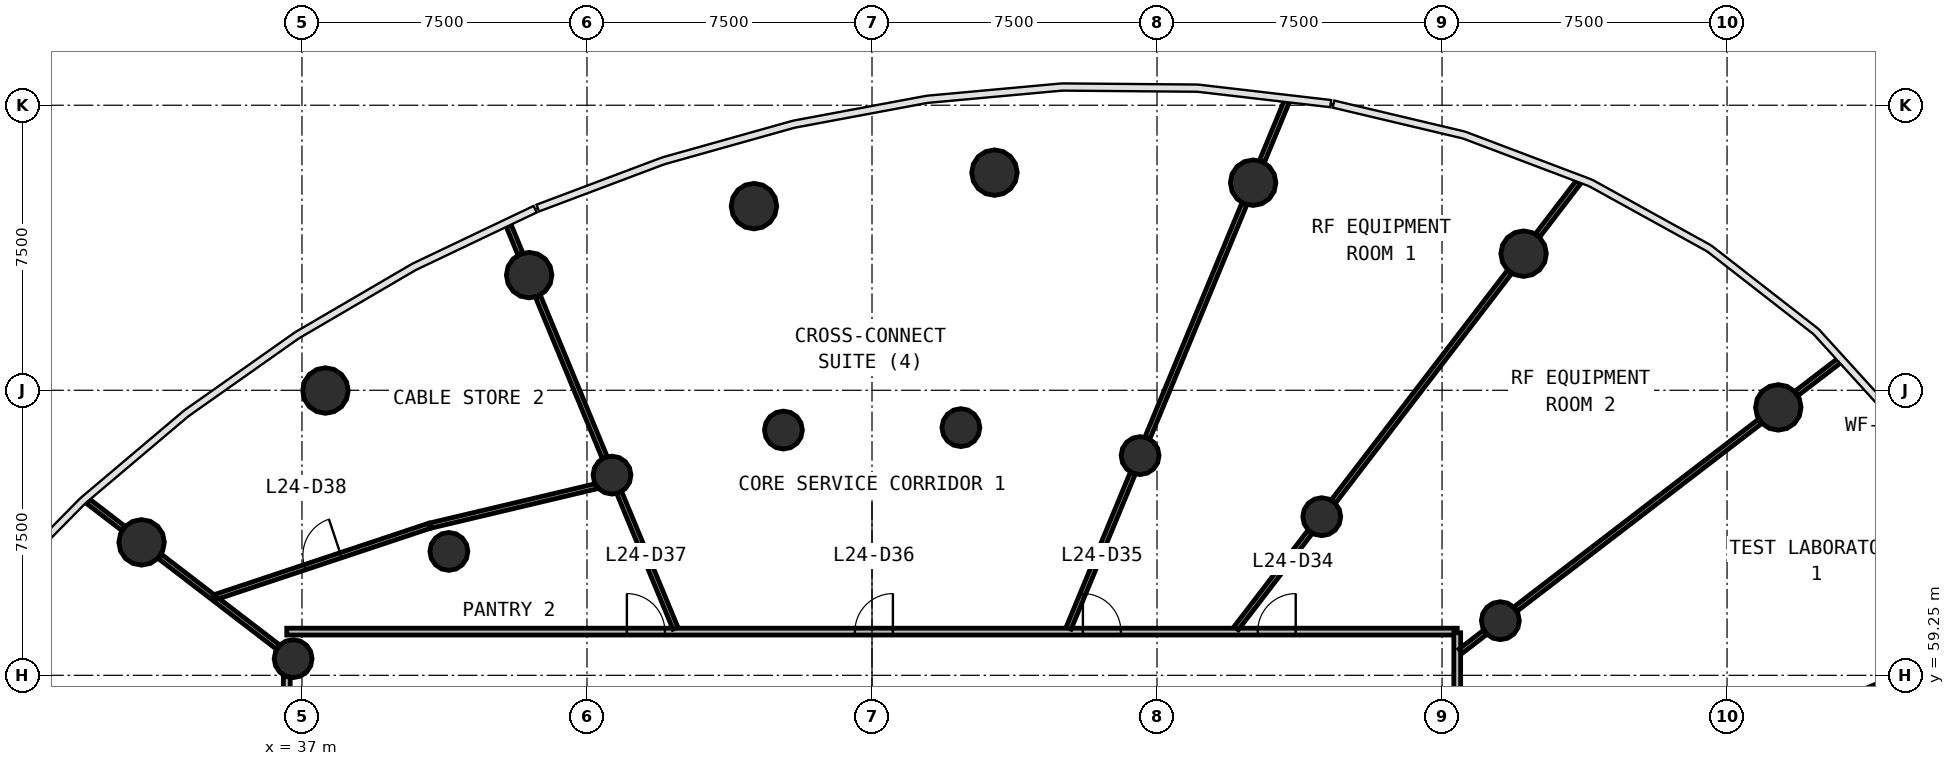
"""IFC4 building model, lengths in metres.
Left out: names, types, materials, properties, quantities, classifications, styles, units other than length and angle.
Written with IfcOpenShell. Run it as: python <this file> out.ifc"""

import sys

from ifc_helpers import new_model, si_unit, direction, frame, frame_2d, origin, origin_2d, place, context, subcontext, project, spatial, rectangle, circle, extrude, source, transform, mapped, element, fill, save


model = new_model("IFC4")
c1 = context("Model", 3, precision=1e-05, world=origin(), true_north=direction((0.0, 1.0)))
c2 = subcontext(c1, "Body", "Model", "MODEL_VIEW")
j1 = project(units=[si_unit("LENGTHUNIT", "METRE"), si_unit("PLANEANGLEUNIT", "RADIAN")], contexts=[c1])
p1 = place(None, origin())
s1 = spatial("IfcSite", under=j1, at=p1, CompositionType="ELEMENT")
p2 = place(p1, origin())
s2 = spatial("IfcBuilding", under=s1, at=p2, CompositionType="ELEMENT")
p3 = place(p2, frame((0.0, 0.0, 104.4)))
s3 = spatial("IfcBuildingStorey", under=s2, at=p3, CompositionType="ELEMENT", Elevation=104.4)
m1 = source(origin(), c2, "Body", "SweptSolid", [
    extrude(circle(Radius=0.6, at=origin_2d()), origin(), (0.0, 0.0, 1.0), 4.1),
])
for number, where, z_axis, x_axis in (
    (1, (75.848, 66.299, 0.0), (0.0, 0.0, 1.0), (1.0, 0.0, 0.0)),
    (2, (69.146, 70.345, 0.0), (0.0, 0.0, 1.0), (1.0, 0.0, 0.0)),
    (3, (62.029, 72.212, 0.0), (0.0, 0.0, 1.0), (1.0, 0.0, 0.0)),
    (4, (55.222, 72.477, 0.0), (0.0, 0.0, 1.0), (1.0, 0.0, 0.0)),
    (5, (48.894, 71.595, 0.0), (0.0, 0.0, 1.0), (1.0, 0.0, 0.0)),
    (6, (42.978, 69.781, 0.0), (0.0, 0.0, 1.0), (1.0, 0.0, 0.0)),
    (7, (37.618, 66.743, 0.0), (0.0, 0.0, 1.0), (1.0, 0.0, 0.0)),
    (8, (32.78, 62.748, 0.0), (0.0, 0.0, 1.0), (1.0, 0.0, 0.0)),
):
    element("IfcColumn", number, at=place(p3, frame(where, z_axis=z_axis, x_axis=x_axis)), inside=s3, PredefinedType="COLUMN", context=c2, shape_type="MappedRepresentation", body=[
        mapped(m1, transform((0.0, 0.0, 0.0), scale=1.0)),
    ])
m2 = source(origin(), c2, "Body", "SweptSolid", [
    extrude(circle(Radius=0.5, at=origin_2d()), origin(), (0.0, 0.0, 1.0), 4.1),
])
for number, where, z_axis, x_axis in (
    (9, (68.535, 60.688, 0.0), (0.0, 0.0, 1.0), (1.0, 0.0, 0.0)),
    (10, (63.835, 63.424, 0.0), (0.0, 0.0, 1.0), (1.0, 0.0, 0.0)),
    (11, (59.055, 65.031, 0.0), (0.0, 0.0, 1.0), (1.0, 0.0, 0.0)),
    (12, (54.339, 65.767, 0.0), (0.0, 0.0, 1.0), (1.0, 0.0, 0.0)),
    (13, (49.669, 65.703, 0.0), (0.0, 0.0, 1.0), (1.0, 0.0, 0.0)),
    (14, (45.158, 64.518, 0.0), (0.0, 0.0, 1.0), (1.0, 0.0, 0.0)),
    (15, (40.866, 62.51, 0.0), (0.0, 0.0, 1.0), (1.0, 0.0, 0.0)),
    (16, (36.768, 59.688, 0.0), (0.0, 0.0, 1.0), (1.0, 0.0, 0.0)),
):
    element("IfcColumn", number, at=place(p3, frame(where, z_axis=z_axis, x_axis=x_axis)), inside=s3, PredefinedType="COLUMN", context=c2, shape_type="MappedRepresentation", body=[
        mapped(m2, transform((0.0, 0.0, 0.0), scale=1.0)),
    ])
p4 = place(p3, frame((36.6, 60.4, 0.0), z_axis=(0.0, 0.0, 1.0), x_axis=(1.0, 0.0, 0.0)))
e17 = element("IfcWall", 17, at=p4, inside=s3, PredefinedType="PARTITIONING", context=c2, shape_type="SweptSolid", body=[
    extrude(rectangle(XDim=30.8, YDim=0.18, at=frame_2d((15.4, 0.0))), origin(), (0.0, 0.0, 1.0), 2.9),
])
p5 = place(p4, frame((25.55, 0.0, 0.0)))
e18 = element("IfcOpeningElement", 18, at=p5, cuts=e17, PredefinedType="OPENING", context=c2, shape_type="SweptSolid", body=[
    extrude(rectangle(XDim=1.0, YDim=2.1, at=frame_2d((0.5, 1.05))), frame((0.0, 0.1, 0.0), z_axis=(0.0, -1.0, 0.0), x_axis=(1.0, 0.0, 0.0)), (0.0, 0.0, 1.0), 0.2),
])
p6 = place(p4, frame((20.95, 0.0, 0.0)))
e19 = element("IfcOpeningElement", 19, at=p6, cuts=e17, PredefinedType="OPENING", context=c2, shape_type="SweptSolid", body=[
    extrude(rectangle(XDim=1.0, YDim=2.1, at=frame_2d((0.5, 1.05))), frame((0.0, 0.1, 0.0), z_axis=(0.0, -1.0, 0.0), x_axis=(1.0, 0.0, 0.0)), (0.0, 0.0, 1.0), 0.2),
])
p7 = place(p4, frame((14.95, 0.0, 0.0)))
e20 = element("IfcOpeningElement", 20, at=p7, cuts=e17, PredefinedType="OPENING", context=c2, shape_type="SweptSolid", body=[
    extrude(rectangle(XDim=1.0, YDim=2.1, at=frame_2d((0.5, 1.05))), frame((0.0, 0.1, 0.0), z_axis=(0.0, -1.0, 0.0), x_axis=(1.0, 0.0, 0.0)), (0.0, 0.0, 1.0), 0.2),
])
p8 = place(p4, frame((8.95, 0.0, 0.0)))
e21 = element("IfcOpeningElement", 21, at=p8, cuts=e17, PredefinedType="OPENING", context=c2, shape_type="SweptSolid", body=[
    extrude(rectangle(XDim=1.0, YDim=2.1, at=frame_2d((0.5, 1.05))), frame((0.0, 0.1, 0.0), z_axis=(0.0, -1.0, 0.0), x_axis=(1.0, 0.0, 0.0)), (0.0, 0.0, 1.0), 0.2),
])
p9 = place(p3, frame((67.4, 60.37, 0.0), z_axis=(0.0, 0.0, 1.0), x_axis=(0.0, -1.0, 0.0)))
e22 = element("IfcWall", 22, at=p9, inside=s3, PredefinedType="PARTITIONING", context=c2, shape_type="SweptSolid", body=[
    extrude(rectangle(XDim=23.583, YDim=0.18, at=frame_2d((11.791, 0.0))), origin(), (0.0, 0.0, 1.0), 2.9),
])
p10 = place(p9, frame((14.732, 0.0, 0.0)))
e23 = element("IfcOpeningElement", 23, at=p10, cuts=e22, PredefinedType="OPENING", context=c2, shape_type="SweptSolid", body=[
    extrude(rectangle(XDim=1.0, YDim=2.1, at=frame_2d((0.5, 1.05))), frame((0.0, 0.1, 0.0), z_axis=(0.0, -1.0, 0.0), x_axis=(1.0, 0.0, 0.0)), (0.0, 0.0, 1.0), 0.2),
])
p11 = place(p9, frame((11.333, 0.0, 0.0)))
e24 = element("IfcOpeningElement", 24, at=p11, cuts=e22, PredefinedType="OPENING", context=c2, shape_type="SweptSolid", body=[
    extrude(rectangle(XDim=1.0, YDim=2.1, at=frame_2d((0.5, 1.05))), frame((0.0, 0.1, 0.0), z_axis=(0.0, -1.0, 0.0), x_axis=(1.0, 0.0, 0.0)), (0.0, 0.0, 1.0), 0.2),
])
p12 = place(p9, frame((4.532, 0.0, 0.0)))
e25 = element("IfcOpeningElement", 25, at=p12, cuts=e22, PredefinedType="OPENING", context=c2, shape_type="SweptSolid", body=[
    extrude(rectangle(XDim=1.0, YDim=2.1, at=frame_2d((0.5, 1.05))), frame((0.0, 0.1, 0.0), z_axis=(0.0, -1.0, 0.0), x_axis=(1.0, 0.0, 0.0)), (0.0, 0.0, 1.0), 0.2),
])
p13 = place(p3, frame((36.6, 35.63, 0.0), z_axis=(0.0, 0.0, 1.0), x_axis=(0.0, 1.0, 0.0)))
e26 = element("IfcWall", 26, at=p13, inside=s3, PredefinedType="PARTITIONING", context=c2, shape_type="SweptSolid", body=[
    extrude(rectangle(XDim=23.583, YDim=0.18, at=frame_2d((11.791, 0.0))), origin(), (0.0, 0.0, 1.0), 2.9),
])
p14 = place(p13, frame((11.333, 0.0, 0.0)))
e27 = element("IfcOpeningElement", 27, at=p14, cuts=e26, PredefinedType="OPENING", context=c2, shape_type="SweptSolid", body=[
    extrude(rectangle(XDim=1.0, YDim=2.1, at=frame_2d((0.5, 1.05))), frame((0.0, 0.1, 0.0), z_axis=(0.0, -1.0, 0.0), x_axis=(1.0, 0.0, 0.0)), (0.0, 0.0, 1.0), 0.2),
])
p15 = place(p13, frame((9.133, 0.0, 0.0)))
e28 = element("IfcOpeningElement", 28, at=p15, cuts=e26, PredefinedType="OPENING", context=c2, shape_type="SweptSolid", body=[
    extrude(rectangle(XDim=1.0, YDim=2.1, at=frame_2d((0.5, 1.05))), frame((0.0, 0.1, 0.0), z_axis=(0.0, -1.0, 0.0), x_axis=(1.0, 0.0, 0.0)), (0.0, 0.0, 1.0), 0.2),
])
p16 = place(p3, frame((68.935, 60.995, 0.0), z_axis=(0.0, 0.0, 1.0), x_axis=(0.793358692504, 0.608754453805, 0.0)))
e29 = element("IfcWall", 29, at=p16, inside=s3, PredefinedType="PARTITIONING", context=c2, shape_type="SweptSolid", body=[
    extrude(rectangle(XDim=8.11, YDim=0.14, at=frame_2d((4.055, 0.0))), origin(), (0.0, 0.0, 1.0), 2.9),
])
p17 = place(p3, frame((64.142, 63.824, 0.0), z_axis=(0.0, 0.0, 1.0), x_axis=(0.608755907151, 0.793357577331, 0.0)))
e30 = element("IfcWall", 30, at=p17, inside=s3, PredefinedType="PARTITIONING", context=c2, shape_type="SweptSolid", body=[
    extrude(rectangle(XDim=7.615, YDim=0.14, at=frame_2d((3.808, 0.0))), origin(), (0.0, 0.0, 1.0), 2.9),
])
p18 = place(p3, frame((59.248, 65.498, 0.0), z_axis=(0.0, 0.0, 1.0), x_axis=(0.382696989205, 0.923873916968, 0.0)))
e31 = element("IfcWall", 31, at=p18, inside=s3, PredefinedType="PARTITIONING", context=c2, shape_type="SweptSolid", body=[
    extrude(rectangle(XDim=6.663, YDim=0.14, at=frame_2d((3.332, 0.0))), origin(), (0.0, 0.0, 1.0), 2.9),
])
p19 = place(p3, frame((34.675, 61.294, 0.0), z_axis=(0.0, 0.0, 1.0), x_axis=(0.948817917671, 0.315823620247, 0.0)))
e32 = element("IfcWall", 32, at=p19, inside=s3, PredefinedType="PARTITIONING", context=c2, shape_type="SweptSolid", body=[
    extrude(rectangle(XDim=5.981, YDim=0.14, at=frame_2d((2.99, 0.0))), origin(), (0.0, 0.0, 1.0), 2.9),
])
p20 = place(p19, frame((2.531, 0.0, 0.0)))
e33 = element("IfcOpeningElement", 33, at=p20, cuts=e32, PredefinedType="OPENING", context=c2, shape_type="SweptSolid", body=[
    extrude(rectangle(XDim=1.0, YDim=2.1, at=frame_2d((0.5, 1.05))), frame((0.0, 0.08, 0.0), z_axis=(0.0, -1.0, 0.0), x_axis=(1.0, 0.0, 0.0)), (0.0, 0.0, 1.0), 0.16),
])
p21 = place(p3, frame((74.998, 57.526, 0.0), z_axis=(0.0, 0.0, 1.0), x_axis=(0.923875965801, 0.382692043051, 0.0)))
e34 = element("IfcWall", 34, at=p21, inside=s3, PredefinedType="PARTITIONING", context=c2, shape_type="SweptSolid", body=[
    extrude(rectangle(XDim=5.302, YDim=0.14, at=frame_2d((2.651, 0.0))), origin(), (0.0, 0.0, 1.0), 2.9),
])
p22 = place(p3, frame((44.965, 64.984, 0.0), z_axis=(0.0, 0.0, 1.0), x_axis=(-0.382705930348, 0.923870213221, 0.0)))
e35 = element("IfcWall", 35, at=p22, inside=s3, PredefinedType="PARTITIONING", context=c2, shape_type="SweptSolid", body=[
    extrude(rectangle(XDim=4.587, YDim=0.14, at=frame_2d((2.293, 0.0))), origin(), (0.0, 0.0, 1.0), 2.9),
])
p23 = place(p3, frame((44.747, 64.226, 0.0), z_axis=(0.0, 0.0, 1.0), x_axis=(-0.973038547424, -0.230642548604, 0.0)))
e36 = element("IfcWall", 36, at=p23, inside=s3, PredefinedType="PARTITIONING", context=c2, shape_type="SweptSolid", body=[
    extrude(rectangle(XDim=4.489, YDim=0.14, at=frame_2d((2.245, 0.0))), origin(), (0.0, 0.0, 1.0), 2.9),
])
p24 = place(p3, frame((57.174, 60.49, 0.0), z_axis=(0.0, 0.0, 1.0), x_axis=(0.382672831764, 0.923883923353, 0.0)))
e37 = element("IfcWall", 37, at=p24, inside=s3, PredefinedType="PARTITIONING", context=c2, shape_type="SweptSolid", body=[
    extrude(rectangle(XDim=4.41, YDim=0.14, at=frame_2d((2.205, 0.0))), origin(), (0.0, 0.0, 1.0), 2.9),
])
p25 = place(p3, frame((46.826, 60.49, 0.0), z_axis=(0.0, 0.0, 1.0), x_axis=(-0.382644558062, 0.923895633817, 0.0)))
e38 = element("IfcWall", 38, at=p25, inside=s3, PredefinedType="PARTITIONING", context=c2, shape_type="SweptSolid", body=[
    extrude(rectangle(XDim=3.854, YDim=0.14, at=frame_2d((1.927, 0.0))), origin(), (0.0, 0.0, 1.0), 2.9),
])
p26 = place(p3, frame((61.584, 60.49, 0.0), z_axis=(0.0, 0.0, 1.0), x_axis=(0.60874605662, 0.793365135703, 0.0)))
e39 = element("IfcWall", 39, at=p26, inside=s3, PredefinedType="PARTITIONING", context=c2, shape_type="SweptSolid", body=[
    extrude(rectangle(XDim=3.194, YDim=0.14, at=frame_2d((1.597, 0.0))), origin(), (0.0, 0.0, 1.0), 2.9),
])
p27 = place(p3, frame((36.367, 59.995, 0.0), z_axis=(0.0, 0.0, 1.0), x_axis=(-0.793389614633, 0.608714152449, 0.0)))
e40 = element("IfcWall", 40, at=p27, inside=s3, PredefinedType="PARTITIONING", context=c2, shape_type="SweptSolid", body=[
    extrude(rectangle(XDim=2.049, YDim=0.14, at=frame_2d((1.024, 0.0))), origin(), (0.0, 0.0, 1.0), 2.9),
])
p28 = place(p3, frame((34.651, 61.312, 0.0), z_axis=(0.0, 0.0, 1.0), x_axis=(-0.793368751306, 0.608741344456, 0.0)))
e41 = element("IfcWall", 41, at=p28, inside=s3, PredefinedType="PARTITIONING", context=c2, shape_type="SweptSolid", body=[
    extrude(rectangle(XDim=1.753, YDim=0.14, at=frame_2d((0.877, 0.0))), origin(), (0.0, 0.0, 1.0), 2.9),
])
p29 = place(p3, frame((69.514, 70.824, 0.0), z_axis=(0.0, 0.0, 1.0), x_axis=(0.608816765526, 0.793310876022, 0.0)))
e42 = element("IfcWall", 42, at=p29, inside=s3, PredefinedType="PARTITIONING", context=c2, shape_type="SweptSolid", body=[
    extrude(rectangle(XDim=1.769, YDim=0.14, at=frame_2d((0.885, 0.0))), origin(), (0.0, 0.0, 1.0), 2.9),
])
p30 = place(p3, frame((62.26, 72.771, 0.0), z_axis=(0.0, 0.0, 1.0), x_axis=(0.382769756697, 0.923843771077, 0.0)))
e43 = element("IfcWall", 43, at=p30, inside=s3, PredefinedType="PARTITIONING", context=c2, shape_type="SweptSolid", body=[
    extrude(rectangle(XDim=1.719, YDim=0.14, at=frame_2d((0.86, 0.0))), origin(), (0.0, 0.0, 1.0), 2.9),
])
p31 = place(p3, frame((76.328, 66.667, 0.0), z_axis=(0.0, 0.0, 1.0), x_axis=(0.793384012646, 0.608721453932, 0.0)))
e44 = element("IfcWall", 44, at=p31, inside=s3, PredefinedType="PARTITIONING", context=c2, shape_type="SweptSolid", body=[
    extrude(rectangle(XDim=1.432, YDim=0.14, at=frame_2d((0.716, 0.0))), origin(), (0.0, 0.0, 1.0), 2.9),
])
p32 = place(p3, frame((32.301, 63.116, 0.0), z_axis=(0.0, 0.0, 1.0), x_axis=(-0.793332880396, 0.608788091935, 0.0)))
e45 = element("IfcWall", 45, at=p32, inside=s3, PredefinedType="PARTITIONING", context=c2, shape_type="SweptSolid", body=[
    extrude(rectangle(XDim=1.164, YDim=0.14, at=frame_2d((0.582, 0.0))), origin(), (0.0, 0.0, 1.0), 2.9),
])
p33 = place(p3, frame((67.49, 59.886, 0.0), z_axis=(0.0, 0.0, 1.0), x_axis=(0.793316076519, 0.608809989025, 0.0)))
e46 = element("IfcWall", 46, at=p33, inside=s3, PredefinedType="PARTITIONING", context=c2, shape_type="SweptSolid", body=[
    extrude(rectangle(XDim=0.812, YDim=0.14, at=frame_2d((0.406, 0.0))), origin(), (0.0, 0.0, 1.0), 2.9),
])
p34 = place(p3, frame((42.747, 70.34, 0.0), z_axis=(0.0, 0.0, 1.0), x_axis=(-0.382520140646, 0.923947153251, 0.0)))
e47 = element("IfcWall", 47, at=p34, inside=s3, PredefinedType="PARTITIONING", context=c2, shape_type="SweptSolid", body=[
    extrude(rectangle(XDim=0.811, YDim=0.14, at=frame_2d((0.406, 0.0))), origin(), (0.0, 0.0, 1.0), 2.9),
])
m3 = source(origin(), c2, "Body", "SweptSolid", [
    extrude(rectangle(XDim=1.0, YDim=2.1, at=frame_2d((0.5, 1.05))), frame((0.0, 0.025, 0.0), z_axis=(0.0, -1.0, 0.0), x_axis=(1.0, 0.0, 0.0)), (0.0, 0.0, 1.0), 0.05),
])
p35 = place(p5, origin())
e48 = element("IfcDoor", 48, at=p35, inside=s3, OperationType="SINGLE_SWING_RIGHT", PredefinedType="DOOR", context=c2, shape_type="MappedRepresentation", body=[
    mapped(m3, transform((0.0, 0.0, 0.0), scale=1.0)),
])
fill(e18, e48)
p36 = place(p6, origin())
e49 = element("IfcDoor", 49, at=p36, inside=s3, OperationType="SINGLE_SWING_LEFT", PredefinedType="DOOR", context=c2, shape_type="MappedRepresentation", body=[
    mapped(m3, transform((0.0, 0.0, 0.0), scale=1.0)),
])
fill(e19, e49)
p37 = place(p7, origin())
e50 = element("IfcDoor", 50, at=p37, inside=s3, OperationType="SINGLE_SWING_RIGHT", PredefinedType="DOOR", context=c2, shape_type="MappedRepresentation", body=[
    mapped(m3, transform((0.0, 0.0, 0.0), scale=1.0)),
])
fill(e20, e50)
p38 = place(p8, origin())
e51 = element("IfcDoor", 51, at=p38, inside=s3, OperationType="SINGLE_SWING_LEFT", PredefinedType="DOOR", context=c2, shape_type="MappedRepresentation", body=[
    mapped(m3, transform((0.0, 0.0, 0.0), scale=1.0)),
])
fill(e21, e51)
p39 = place(p20, origin())
e52 = element("IfcDoor", 52, at=p39, inside=s3, OperationType="SINGLE_SWING_RIGHT", PredefinedType="DOOR", context=c2, shape_type="MappedRepresentation", body=[
    mapped(m3, transform((0.0, 0.0, 0.0), scale=1.0)),
])
fill(e33, e52)
save(model, sys.argv[1])
